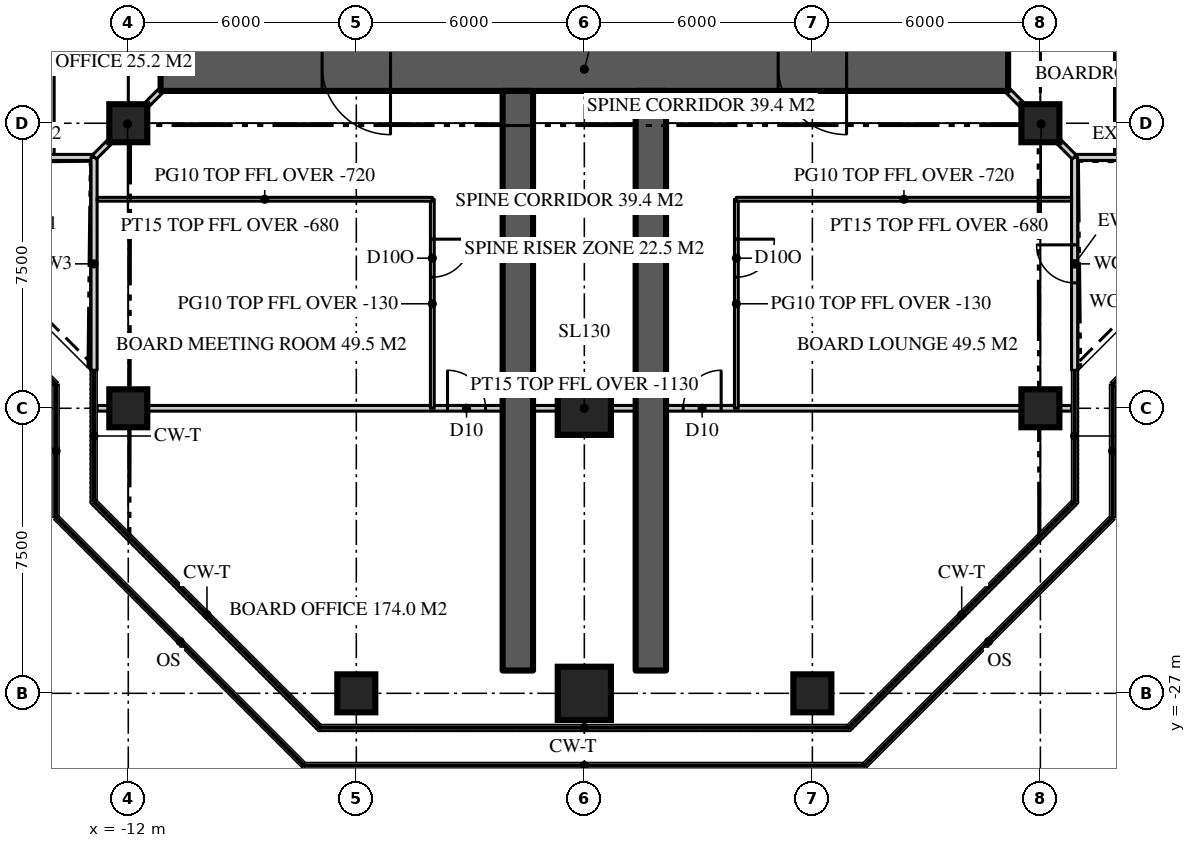
"""IFC4 building model, lengths in metres.
Left out: names, types, materials, properties, quantities, classifications, styles, units other than length and angle.
Written with IfcOpenShell. Run it as: python <this file> out.ifc"""

import sys

from ifc_helpers import new_model, si_unit, direction, frame, frame_2d, origin, origin_2d, place, context, subcontext, project, spatial, rectangle, extrude, element, fill, save


model = new_model("IFC4")
c1 = context("Model", 3, precision=1e-05, world=origin(), true_north=direction((0.0, 1.0)))
c2 = subcontext(c1, "Body", "Model", "MODEL_VIEW")
j1 = project(units=[si_unit("LENGTHUNIT", "METRE"), si_unit("PLANEANGLEUNIT", "RADIAN")], contexts=[c1])
p1 = place(None, origin())
s1 = spatial("IfcSite", under=j1, at=p1, CompositionType="ELEMENT")
p2 = place(p1, origin())
s2 = spatial("IfcBuilding", under=s1, at=p2, CompositionType="ELEMENT")
p3 = place(p2, frame((0.0, 0.0, 290.7)))
s3 = spatial("IfcBuildingStorey", under=s2, at=p3, CompositionType="ELEMENT", Elevation=290.7)
p4 = place(p3, frame((11.15, -10.5, 0.0), z_axis=(0.0, 0.0, 1.0), x_axis=(-1.0, 0.0, 0.0)))
e1 = element("IfcWall", 1, at=p4, inside=s3, PredefinedType="SHEAR", context=c2, shape_type="SweptSolid", body=[
    extrude(rectangle(XDim=22.3, YDim=1.3, at=frame_2d((11.15, 0.0))), origin(), (0.0, 0.0, 1.0), 3.9),
])
p5 = place(p4, frame((16.25, 0.0, 0.0)))
e2 = element("IfcOpeningElement", 2, at=p5, cuts=e1, PredefinedType="OPENING", context=c2, shape_type="SweptSolid", body=[
    extrude(rectangle(XDim=1.8, YDim=2.2, at=frame_2d((0.9, 1.1))), frame((0.0, 0.66, 0.0), z_axis=(0.0, -1.0, 0.0), x_axis=(1.0, 0.0, 0.0)), (0.0, 0.0, 1.0), 1.32),
])
p6 = place(p4, frame((4.25, 0.0, 0.0)))
e3 = element("IfcOpeningElement", 3, at=p6, cuts=e1, PredefinedType="OPENING", context=c2, shape_type="SweptSolid", body=[
    extrude(rectangle(XDim=1.8, YDim=2.2, at=frame_2d((0.9, 1.1))), frame((0.0, 0.66, 0.0), z_axis=(0.0, -1.0, 0.0), x_axis=(1.0, 0.0, 0.0)), (0.0, 0.0, 1.0), 1.32),
])
for number, where, z_axis, x_axis in (
    (4, (-1.75, -11.15, 0.0), (0.0, 0.0, 1.0), (0.0, -1.0, 0.0)),
    (5, (1.75, -11.15, 0.0), (0.0, 0.0, 1.0), (0.0, -1.0, 0.0)),
):
    element("IfcWall", number, at=place(p3, frame(where, z_axis=z_axis, x_axis=x_axis)), inside=s3, PredefinedType="SHEAR", context=c2, shape_type="SweptSolid", body=[
        extrude(rectangle(XDim=15.25, YDim=0.8, at=frame_2d((7.625, 0.0))), origin(), (0.0, 0.0, 1.0), 3.9),
    ])
p7 = place(p3, frame((-6.0, -27.0, 0.0), z_axis=(0.0, 0.0, 1.0), x_axis=(1.0, 0.0, 0.0)))
e6 = element("IfcColumn", 6, at=p7, inside=s3, PredefinedType="COLUMN", context=c2, shape_type="SweptSolid", body=[
    extrude(rectangle(XDim=1.0, YDim=1.0, at=origin_2d()), origin(), (0.0, 0.0, 1.0), 3.9),
])
p8 = place(p3, frame((0.0, -27.0, 0.0), z_axis=(0.0, 0.0, 1.0), x_axis=(1.0, 0.0, 0.0)))
e7 = element("IfcColumn", 7, at=p8, inside=s3, PredefinedType="COLUMN", context=c2, shape_type="SweptSolid", body=[
    extrude(rectangle(XDim=1.4, YDim=1.4, at=origin_2d()), origin(), (0.0, 0.0, 1.0), 3.9),
])
for number, where, z_axis, x_axis in (
    (8, (6.0, -27.0, 0.0), (0.0, 0.0, 1.0), (1.0, 0.0, 0.0)),
    (9, (-12.0, -19.5, 0.0), (0.0, 0.0, 1.0), (1.0, 0.0, 0.0)),
):
    element("IfcColumn", number, at=place(p3, frame(where, z_axis=z_axis, x_axis=x_axis)), inside=s3, PredefinedType="COLUMN", context=c2, shape_type="SweptSolid", body=[
        extrude(rectangle(XDim=1.0, YDim=1.0, at=origin_2d()), origin(), (0.0, 0.0, 1.0), 3.9),
    ])
p9 = place(p3, frame((0.0, -19.5, 0.0), z_axis=(0.0, 0.0, 1.0), x_axis=(1.0, 0.0, 0.0)))
e10 = element("IfcColumn", 10, at=p9, inside=s3, PredefinedType="COLUMN", context=c2, shape_type="SweptSolid", body=[
    extrude(rectangle(XDim=1.4, YDim=1.4, at=origin_2d()), origin(), (0.0, 0.0, 1.0), 3.9),
])
for number, where, z_axis, x_axis in (
    (11, (12.0, -19.5, 0.0), (0.0, 0.0, 1.0), (1.0, 0.0, 0.0)),
    (12, (-12.0, -12.0, 0.0), (0.0, 0.0, 1.0), (1.0, 0.0, 0.0)),
    (13, (12.0, -12.0, 0.0), (0.0, 0.0, 1.0), (1.0, 0.0, 0.0)),
):
    element("IfcColumn", number, at=place(p3, frame(where, z_axis=z_axis, x_axis=x_axis)), inside=s3, PredefinedType="COLUMN", context=c2, shape_type="SweptSolid", body=[
        extrude(rectangle(XDim=1.0, YDim=1.0, at=origin_2d()), origin(), (0.0, 0.0, 1.0), 3.9),
    ])
p10 = place(p3, frame((12.9, -12.9, 0.0), z_axis=(0.0, 0.0, 1.0), x_axis=(1.0, 0.0, 0.0)))
e14 = element("IfcWall", 14, at=p10, inside=s3, PredefinedType="SOLIDWALL", context=c2, shape_type="SweptSolid", body=[
    extrude(rectangle(XDim=5.6, YDim=0.16, at=frame_2d((2.8, 0.0))), origin(), (0.0, 0.0, 1.0), 3.77),
])
p11 = place(p3, frame((-18.5, -12.9, 0.0), z_axis=(0.0, 0.0, 1.0), x_axis=(1.0, 0.0, 0.0)))
e15 = element("IfcWall", 15, at=p11, inside=s3, PredefinedType="SOLIDWALL", context=c2, shape_type="SweptSolid", body=[
    extrude(rectangle(XDim=5.6, YDim=0.16, at=frame_2d((2.8, 0.0))), origin(), (0.0, 0.0, 1.0), 3.77),
])
p12 = place(p11, frame((2.3, 0.0, 0.0)))
e16 = element("IfcOpeningElement", 16, at=p12, cuts=e15, PredefinedType="OPENING", context=c2, shape_type="SweptSolid", body=[
    extrude(rectangle(XDim=1.0, YDim=2.2, at=frame_2d((0.5, 1.1))), frame((0.0, 0.09, 0.0), z_axis=(0.0, -1.0, 0.0), x_axis=(1.0, 0.0, 0.0)), (0.0, 0.0, 1.0), 0.18),
])
p13 = place(p3, frame((-12.9, -12.9, 0.0), z_axis=(0.0, 0.0, 1.0), x_axis=(0.0, -1.0, 0.0)))
e17 = element("IfcWall", 17, at=p13, inside=s3, PredefinedType="SOLIDWALL", context=c2, shape_type="SweptSolid", body=[
    extrude(rectangle(XDim=5.6, YDim=0.16, at=frame_2d((2.8, 0.0))), origin(), (0.0, 0.0, 1.0), 3.77),
])
p14 = place(p3, frame((12.9, -18.5, 0.0), z_axis=(0.0, 0.0, 1.0), x_axis=(0.0, 1.0, 0.0)))
e18 = element("IfcWall", 18, at=p14, inside=s3, PredefinedType="SOLIDWALL", context=c2, shape_type="SweptSolid", body=[
    extrude(rectangle(XDim=5.6, YDim=0.16, at=frame_2d((2.8, 0.0))), origin(), (0.0, 0.0, 1.0), 3.77),
])
p15 = place(p14, frame((2.3, 0.0, 0.0)))
e19 = element("IfcOpeningElement", 19, at=p15, cuts=e18, PredefinedType="OPENING", context=c2, shape_type="SweptSolid", body=[
    extrude(rectangle(XDim=1.0, YDim=2.2, at=frame_2d((0.5, 1.1))), frame((0.0, 0.09, 0.0), z_axis=(0.0, -1.0, 0.0), x_axis=(1.0, 0.0, 0.0)), (0.0, 0.0, 1.0), 0.18),
])
for number, where, z_axis, x_axis in (
    (20, (14.0, -4.0, 0.0), (0.0, 0.0, 1.0), (0.0, -1.0, 0.0)),
    (21, (-14.0, -4.0, 0.0), (0.0, 0.0, 1.0), (0.0, -1.0, 0.0)),
):
    element("IfcWall", number, at=place(p3, frame(where, z_axis=z_axis, x_axis=x_axis)), inside=s3, PredefinedType="PARTITIONING", context=c2, shape_type="SweptSolid", body=[
        extrude(rectangle(XDim=8.82, YDim=0.1, at=frame_2d((4.41, 0.0))), origin(), (0.0, 0.0, 1.0), 3.18),
    ])
p16 = place(p3, frame((-12.82, -19.5, 0.0), z_axis=(0.0, 0.0, 1.0), x_axis=(1.0, 0.0, 0.0)))
e22 = element("IfcWall", 22, at=p16, inside=s3, PredefinedType="PARTITIONING", context=c2, shape_type="SweptSolid", body=[
    extrude(rectangle(XDim=25.64, YDim=0.15, at=frame_2d((12.82, 0.0))), origin(), (0.0, 0.0, 1.0), 2.77),
])
p17 = place(p16, frame((15.42, 0.0, 0.0)))
e23 = element("IfcOpeningElement", 23, at=p17, cuts=e22, PredefinedType="OPENING", context=c2, shape_type="SweptSolid", body=[
    extrude(rectangle(XDim=1.0, YDim=2.2, at=frame_2d((0.5, 1.1))), frame((0.0, 0.085, 0.0), z_axis=(0.0, -1.0, 0.0), x_axis=(1.0, 0.0, 0.0)), (0.0, 0.0, 1.0), 0.17),
])
p18 = place(p16, frame((9.22, 0.0, 0.0)))
e24 = element("IfcOpeningElement", 24, at=p18, cuts=e22, PredefinedType="OPENING", context=c2, shape_type="SweptSolid", body=[
    extrude(rectangle(XDim=1.0, YDim=2.2, at=frame_2d((0.5, 1.1))), frame((0.0, 0.085, 0.0), z_axis=(0.0, -1.0, 0.0), x_axis=(1.0, 0.0, 0.0)), (0.0, 0.0, 1.0), 0.17),
])
p19 = place(p3, frame((4.0, -14.0, 0.0), z_axis=(0.0, 0.0, 1.0), x_axis=(0.0, -1.0, 0.0)))
e25 = element("IfcWall", 25, at=p19, inside=s3, PredefinedType="PARTITIONING", context=c2, shape_type="SweptSolid", body=[
    extrude(rectangle(XDim=5.5, YDim=0.1, at=frame_2d((2.75, 0.0))), origin(), (0.0, 0.0, 1.0), 3.77),
])
p20 = place(p19, frame((1.05, 0.0, 0.0)))
e26 = element("IfcOpeningElement", 26, at=p20, cuts=e25, PredefinedType="OPENING", context=c2, shape_type="SweptSolid", body=[
    extrude(rectangle(XDim=1.0, YDim=2.2, at=frame_2d((0.5, 1.1))), frame((0.0, 0.06, 0.0), z_axis=(0.0, -1.0, 0.0), x_axis=(1.0, 0.0, 0.0)), (0.0, 0.0, 1.0), 0.12),
])
p21 = place(p3, frame((4.0, -14.0, 0.0), z_axis=(0.0, 0.0, 1.0), x_axis=(1.0, 0.0, 0.0)))
e27 = element("IfcWall", 27, at=p21, inside=s3, PredefinedType="PARTITIONING", context=c2, shape_type="SweptSolid", body=[
    extrude(rectangle(XDim=8.82, YDim=0.1, at=frame_2d((4.41, 0.0))), origin(), (0.0, 0.0, 1.0), 3.18),
])
p22 = place(p3, frame((-4.0, -14.0, 0.0), z_axis=(0.0, 0.0, 1.0), x_axis=(0.0, -1.0, 0.0)))
e28 = element("IfcWall", 28, at=p22, inside=s3, PredefinedType="PARTITIONING", context=c2, shape_type="SweptSolid", body=[
    extrude(rectangle(XDim=5.5, YDim=0.1, at=frame_2d((2.75, 0.0))), origin(), (0.0, 0.0, 1.0), 3.77),
])
p23 = place(p22, frame((1.05, 0.0, 0.0)))
e29 = element("IfcOpeningElement", 29, at=p23, cuts=e28, PredefinedType="OPENING", context=c2, shape_type="SweptSolid", body=[
    extrude(rectangle(XDim=1.0, YDim=2.2, at=frame_2d((0.5, 1.1))), frame((0.0, 0.06, 0.0), z_axis=(0.0, -1.0, 0.0), x_axis=(1.0, 0.0, 0.0)), (0.0, 0.0, 1.0), 0.12),
])
p24 = place(p3, frame((-4.0, -14.0, 0.0), z_axis=(0.0, 0.0, 1.0), x_axis=(-1.0, 0.0, 0.0)))
e30 = element("IfcWall", 30, at=p24, inside=s3, PredefinedType="PARTITIONING", context=c2, shape_type="SweptSolid", body=[
    extrude(rectangle(XDim=8.82, YDim=0.1, at=frame_2d((4.41, 0.0))), origin(), (0.0, 0.0, 1.0), 3.18),
])
for number, where, z_axis, x_axis in (
    (31, (-11.15, -11.15, 0.0), (0.0, 0.0, 1.0), (-0.707, -0.707, 0.0)),
    (32, (11.15, -11.15, 0.0), (0.0, 0.0, 1.0), (0.707, -0.707, 0.0)),
):
    element("IfcWall", number, at=place(p3, frame(where, z_axis=z_axis, x_axis=x_axis)), inside=s3, PredefinedType="PARTITIONING", context=c2, shape_type="SweptSolid", body=[
        extrude(rectangle(XDim=2.461, YDim=0.15, at=frame_2d((1.23, 0.0))), origin(), (0.0, 0.0, 1.0), 3.22),
    ])
p25 = place(p15, origin())
e33 = element("IfcDoor", 33, at=p25, inside=s3, OperationType="SINGLE_SWING_RIGHT", PredefinedType="DOOR", context=c2, shape_type="SweptSolid", body=[
    extrude(rectangle(XDim=1.0, YDim=2.2, at=frame_2d((0.5, 1.1))), frame((0.0, 0.025, 0.0), z_axis=(0.0, -1.0, 0.0), x_axis=(1.0, 0.0, 0.0)), (0.0, 0.0, 1.0), 0.05),
])
fill(e19, e33)
p26 = place(p5, origin())
e34 = element("IfcDoor", 34, at=p26, inside=s3, OperationType="DOUBLE_DOOR_DOUBLE_SWING", PredefinedType="DOOR", context=c2, shape_type="SweptSolid", body=[
    extrude(rectangle(XDim=1.8, YDim=2.2, at=frame_2d((0.9, 1.1))), frame((0.0, 0.025, 0.0), z_axis=(0.0, -1.0, 0.0), x_axis=(1.0, 0.0, 0.0)), (0.0, 0.0, 1.0), 0.05),
])
fill(e2, e34)
p27 = place(p6, origin())
e35 = element("IfcDoor", 35, at=p27, inside=s3, OperationType="DOUBLE_DOOR_DOUBLE_SWING", PredefinedType="DOOR", context=c2, shape_type="SweptSolid", body=[
    extrude(rectangle(XDim=1.8, YDim=2.2, at=frame_2d((0.9, 1.1))), frame((0.0, 0.025, 0.0), z_axis=(0.0, -1.0, 0.0), x_axis=(1.0, 0.0, 0.0)), (0.0, 0.0, 1.0), 0.05),
])
fill(e3, e35)
p28 = place(p17, origin())
e36 = element("IfcDoor", 36, at=p28, inside=s3, OperationType="SINGLE_SWING_RIGHT", PredefinedType="DOOR", context=c2, shape_type="SweptSolid", body=[
    extrude(rectangle(XDim=1.0, YDim=2.2, at=frame_2d((0.5, 1.1))), frame((0.0, 0.025, 0.0), z_axis=(0.0, -1.0, 0.0), x_axis=(1.0, 0.0, 0.0)), (0.0, 0.0, 1.0), 0.05),
])
fill(e23, e36)
p29 = place(p18, origin())
e37 = element("IfcDoor", 37, at=p29, inside=s3, OperationType="SINGLE_SWING_LEFT", PredefinedType="DOOR", context=c2, shape_type="SweptSolid", body=[
    extrude(rectangle(XDim=1.0, YDim=2.2, at=frame_2d((0.5, 1.1))), frame((0.0, 0.025, 0.0), z_axis=(0.0, -1.0, 0.0), x_axis=(1.0, 0.0, 0.0)), (0.0, 0.0, 1.0), 0.05),
])
fill(e24, e37)
p30 = place(p20, origin())
e38 = element("IfcDoor", 38, at=p30, inside=s3, OperationType="SINGLE_SWING_LEFT", PredefinedType="DOOR", context=c2, shape_type="SweptSolid", body=[
    extrude(rectangle(XDim=1.0, YDim=2.2, at=frame_2d((0.5, 1.1))), frame((0.0, 0.025, 0.0), z_axis=(0.0, -1.0, 0.0), x_axis=(1.0, 0.0, 0.0)), (0.0, 0.0, 1.0), 0.05),
])
fill(e26, e38)
p31 = place(p23, origin())
e39 = element("IfcDoor", 39, at=p31, inside=s3, OperationType="SINGLE_SWING_LEFT", PredefinedType="DOOR", context=c2, shape_type="SweptSolid", body=[
    extrude(rectangle(XDim=1.0, YDim=2.2, at=frame_2d((0.5, 1.1))), frame((0.0, 0.025, 0.0), z_axis=(0.0, -1.0, 0.0), x_axis=(1.0, 0.0, 0.0)), (0.0, 0.0, 1.0), 0.05),
])
fill(e29, e39)
save(model, sys.argv[1])
